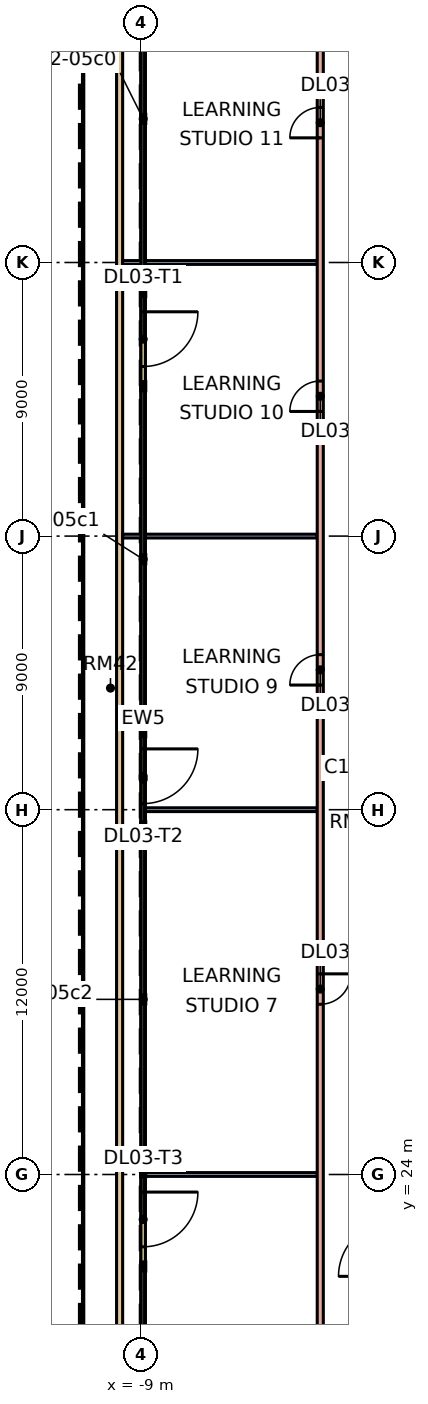
"""IFC4 building model, lengths in metres.
Left out: names, types, materials, properties, quantities, classifications, styles, units other than length and angle.
Written with IfcOpenShell. Run it as: python <this file> out.ifc"""

import sys

from ifc_helpers import new_model, si_unit, direction, frame, frame_2d, origin, place, context, subcontext, project, spatial, rectangle, extrude, element, fill, save


model = new_model("IFC4")
c1 = context("Model", 3, precision=1e-05, world=origin(), true_north=direction((0.0, 1.0)))
c2 = subcontext(c1, "Body", "Model", "MODEL_VIEW")
j1 = project(units=[si_unit("LENGTHUNIT", "METRE"), si_unit("PLANEANGLEUNIT", "RADIAN")], contexts=[c1])
p1 = place(None, origin())
s1 = spatial("IfcSite", under=j1, at=p1, CompositionType="ELEMENT")
p2 = place(p1, origin())
s2 = spatial("IfcBuilding", under=s1, at=p2, CompositionType="ELEMENT")
p3 = place(p2, frame((0.0, 0.0, 16.8)))
s3 = spatial("IfcBuildingStorey", under=s2, at=p3, CompositionType="ELEMENT", Elevation=16.8)
p4 = place(p3, frame((-8.925, 52.978, 0.0), z_axis=(0.0, 0.0, 1.0), x_axis=(0.0, -1.0, 0.0)))
e1 = element("IfcWall", 1, at=p4, inside=s3, PredefinedType="SOLIDWALL", context=c2, shape_type="SweptSolid", body=[
    extrude(rectangle(XDim=3.0, YDim=0.15, at=frame_2d((1.5, 0.0))), origin(), (0.0, 0.0, 1.0), 4.4),
])
p5 = place(p4, frame((0.6, 0.0, 0.0)))
e2 = element("IfcOpeningElement", 2, at=p5, cuts=e1, PredefinedType="OPENING", context=c2, shape_type="SweptSolid", body=[
    extrude(rectangle(XDim=1.8, YDim=2.4, at=frame_2d((0.9, 1.2))), frame((0.0, 0.085, 0.0), z_axis=(0.0, -1.0, 0.0), x_axis=(1.0, 0.0, 0.0)), (0.0, 0.0, 1.0), 0.17),
])
p6 = place(p3, frame((-8.925, 38.5, 0.0), z_axis=(0.0, 0.0, 1.0), x_axis=(0.0, -1.0, 0.0)))
e3 = element("IfcWall", 3, at=p6, inside=s3, PredefinedType="SOLIDWALL", context=c2, shape_type="SweptSolid", body=[
    extrude(rectangle(XDim=3.0, YDim=0.15, at=frame_2d((1.5, 0.0))), origin(), (0.0, 0.0, 1.0), 4.4),
])
p7 = place(p6, frame((0.5, 0.0, 0.0)))
e4 = element("IfcOpeningElement", 4, at=p7, cuts=e3, PredefinedType="OPENING", context=c2, shape_type="SweptSolid", body=[
    extrude(rectangle(XDim=1.8, YDim=2.4, at=frame_2d((0.9, 1.2))), frame((0.0, 0.085, 0.0), z_axis=(0.0, -1.0, 0.0), x_axis=(1.0, 0.0, 0.0)), (0.0, 0.0, 1.0), 0.17),
])
p8 = place(p3, frame((-8.925, 24.022, 0.0), z_axis=(0.0, 0.0, 1.0), x_axis=(0.0, -1.0, 0.0)))
e5 = element("IfcWall", 5, at=p8, inside=s3, PredefinedType="SOLIDWALL", context=c2, shape_type="SweptSolid", body=[
    extrude(rectangle(XDim=3.0, YDim=0.15, at=frame_2d((1.5, 0.0))), origin(), (0.0, 0.0, 1.0), 4.4),
])
p9 = place(p8, frame((0.6, 0.0, 0.0)))
e6 = element("IfcOpeningElement", 6, at=p9, cuts=e5, PredefinedType="OPENING", context=c2, shape_type="SweptSolid", body=[
    extrude(rectangle(XDim=1.8, YDim=2.4, at=frame_2d((0.9, 1.2))), frame((0.0, 0.085, 0.0), z_axis=(0.0, -1.0, 0.0), x_axis=(1.0, 0.0, 0.0)), (0.0, 0.0, 1.0), 0.17),
])
p10 = place(p3, frame((-9.7, 9.104, 0.0), z_axis=(0.0, 0.0, 1.0), x_axis=(0.0, 1.0, 0.0)))
e7 = element("IfcWall", 7, at=p10, inside=s3, PredefinedType="PARAPET", context=c2, shape_type="SweptSolid", body=[
    extrude(rectangle(XDim=55.793, YDim=0.2, at=frame_2d((27.896, 0.0))), origin(), (0.0, 0.0, 1.0), 0.5),
])
for number, where, z_axis, x_axis in (
    (8, (-9.6, 45.0, 0.0), (0.0, 0.0, 1.0), (1.0, 0.0, 0.0)),
    (9, (-9.6, 54.0, 0.0), (0.0, 0.0, 1.0), (1.0, 0.0, 0.0)),
):
    element("IfcWall", number, at=place(p3, frame(where, z_axis=z_axis, x_axis=x_axis)), inside=s3, PredefinedType="PARTITIONING", context=c2, shape_type="SweptSolid", body=[
        extrude(rectangle(XDim=6.4, YDim=0.125, at=frame_2d((3.2, 0.0))), origin(), (0.0, 0.0, 1.0), 4.4),
    ])
for number, where, z_axis, x_axis in (
    (10, (-8.851, 24.0, 0.0), (0.0, 0.0, 1.0), (1.0, 0.0, 0.0)),
    (11, (-8.851, 36.0, 0.0), (0.0, 0.0, 1.0), (1.0, 0.0, 0.0)),
):
    element("IfcWall", number, at=place(p3, frame(where, z_axis=z_axis, x_axis=x_axis)), inside=s3, PredefinedType="PARTITIONING", context=c2, shape_type="SweptSolid", body=[
        extrude(rectangle(XDim=5.651, YDim=0.125, at=frame_2d((2.826, 0.0))), origin(), (0.0, 0.0, 1.0), 4.4),
    ])
p11 = place(p3, frame((-3.1, 2.645, 0.0), z_axis=(0.0, 0.0, 1.0), x_axis=(0.0, 1.0, 0.0)))
e12 = element("IfcWall", 12, at=p11, inside=s3, PredefinedType="PARTITIONING", context=c2, shape_type="SweptSolid", body=[
    extrude(rectangle(XDim=63.455, YDim=0.2, at=frame_2d((31.728, 0.0))), origin(), (0.0, 0.0, 1.0), 4.4),
])
p12 = place(p11, frame((4.705, 0.0, 0.0)))
e13 = element("IfcOpeningElement", 13, at=p12, cuts=e12, PredefinedType="OPENING", context=c2, shape_type="SweptSolid", body=[
    extrude(rectangle(XDim=1.0, YDim=2.1, at=frame_2d((0.5, 1.05))), frame((0.0, 0.11, 0.0), z_axis=(0.0, -1.0, 0.0), x_axis=(1.0, 0.0, 0.0)), (0.0, 0.0, 1.0), 0.22),
])
p13 = place(p11, frame((14.955, 0.0, 0.0)))
e14 = element("IfcOpeningElement", 14, at=p13, cuts=e12, PredefinedType="OPENING", context=c2, shape_type="SweptSolid", body=[
    extrude(rectangle(XDim=1.0, YDim=2.1, at=frame_2d((0.5, 1.05))), frame((0.0, 0.11, 0.0), z_axis=(0.0, -1.0, 0.0), x_axis=(1.0, 0.0, 0.0)), (0.0, 0.0, 1.0), 0.22),
])
p14 = place(p11, frame((26.955, 0.0, 0.0)))
e15 = element("IfcOpeningElement", 15, at=p14, cuts=e12, PredefinedType="OPENING", context=c2, shape_type="SweptSolid", body=[
    extrude(rectangle(XDim=1.0, YDim=2.1, at=frame_2d((0.5, 1.05))), frame((0.0, 0.11, 0.0), z_axis=(0.0, -1.0, 0.0), x_axis=(1.0, 0.0, 0.0)), (0.0, 0.0, 1.0), 0.22),
])
p15 = place(p11, frame((37.455, 0.0, 0.0)))
e16 = element("IfcOpeningElement", 16, at=p15, cuts=e12, PredefinedType="OPENING", context=c2, shape_type="SweptSolid", body=[
    extrude(rectangle(XDim=1.0, YDim=2.1, at=frame_2d((0.5, 1.05))), frame((0.0, 0.11, 0.0), z_axis=(0.0, -1.0, 0.0), x_axis=(1.0, 0.0, 0.0)), (0.0, 0.0, 1.0), 0.22),
])
p16 = place(p11, frame((46.455, 0.0, 0.0)))
e17 = element("IfcOpeningElement", 17, at=p16, cuts=e12, PredefinedType="OPENING", context=c2, shape_type="SweptSolid", body=[
    extrude(rectangle(XDim=1.0, YDim=2.1, at=frame_2d((0.5, 1.05))), frame((0.0, 0.11, 0.0), z_axis=(0.0, -1.0, 0.0), x_axis=(1.0, 0.0, 0.0)), (0.0, 0.0, 1.0), 0.22),
])
p17 = place(p11, frame((55.455, 0.0, 0.0)))
e18 = element("IfcOpeningElement", 18, at=p17, cuts=e12, PredefinedType="OPENING", context=c2, shape_type="SweptSolid", body=[
    extrude(rectangle(XDim=1.0, YDim=2.1, at=frame_2d((0.5, 1.05))), frame((0.0, 0.11, 0.0), z_axis=(0.0, -1.0, 0.0), x_axis=(1.0, 0.0, 0.0)), (0.0, 0.0, 1.0), 0.22),
])
p18 = place(p11, frame((61.305, 0.0, 0.0)))
e19 = element("IfcOpeningElement", 19, at=p18, cuts=e12, PredefinedType="OPENING", context=c2, shape_type="SweptSolid", body=[
    extrude(rectangle(XDim=1.0, YDim=2.1, at=frame_2d((0.5, 1.05))), frame((0.0, 0.11, 0.0), z_axis=(0.0, -1.0, 0.0), x_axis=(1.0, 0.0, 0.0)), (0.0, 0.0, 1.0), 0.22),
])
p19 = place(p5, origin())
e20 = element("IfcDoor", 20, at=p19, inside=s3, OperationType="DOUBLE_DOOR_SINGLE_SWING", PredefinedType="DOOR", context=c2, shape_type="SweptSolid", body=[
    extrude(rectangle(XDim=1.8, YDim=2.4, at=frame_2d((0.9, 1.2))), frame((0.0, 0.025, 0.0), z_axis=(0.0, -1.0, 0.0), x_axis=(1.0, 0.0, 0.0)), (0.0, 0.0, 1.0), 0.05),
])
fill(e2, e20)
p20 = place(p7, origin())
e21 = element("IfcDoor", 21, at=p20, inside=s3, OperationType="DOUBLE_DOOR_SINGLE_SWING", PredefinedType="DOOR", context=c2, shape_type="SweptSolid", body=[
    extrude(rectangle(XDim=1.8, YDim=2.4, at=frame_2d((0.9, 1.2))), frame((0.0, 0.025, 0.0), z_axis=(0.0, -1.0, 0.0), x_axis=(1.0, 0.0, 0.0)), (0.0, 0.0, 1.0), 0.05),
])
fill(e4, e21)
p21 = place(p9, origin())
e22 = element("IfcDoor", 22, at=p21, inside=s3, OperationType="DOUBLE_DOOR_SINGLE_SWING", PredefinedType="DOOR", context=c2, shape_type="SweptSolid", body=[
    extrude(rectangle(XDim=1.8, YDim=2.4, at=frame_2d((0.9, 1.2))), frame((0.0, 0.025, 0.0), z_axis=(0.0, -1.0, 0.0), x_axis=(1.0, 0.0, 0.0)), (0.0, 0.0, 1.0), 0.05),
])
fill(e6, e22)
p22 = place(p14, origin())
e23 = element("IfcDoor", 23, at=p22, inside=s3, OperationType="SINGLE_SWING_RIGHT", PredefinedType="DOOR", context=c2, shape_type="SweptSolid", body=[
    extrude(rectangle(XDim=1.0, YDim=2.1, at=frame_2d((0.5, 1.05))), frame((0.0, 0.025, 0.0), z_axis=(0.0, -1.0, 0.0), x_axis=(1.0, 0.0, 0.0)), (0.0, 0.0, 1.0), 0.05),
])
fill(e15, e23)
p23 = place(p15, origin())
e24 = element("IfcDoor", 24, at=p23, inside=s3, OperationType="SINGLE_SWING_LEFT", PredefinedType="DOOR", context=c2, shape_type="SweptSolid", body=[
    extrude(rectangle(XDim=1.0, YDim=2.1, at=frame_2d((0.5, 1.05))), frame((0.0, 0.025, 0.0), z_axis=(0.0, -1.0, 0.0), x_axis=(1.0, 0.0, 0.0)), (0.0, 0.0, 1.0), 0.05),
])
fill(e16, e24)
p24 = place(p16, origin())
e25 = element("IfcDoor", 25, at=p24, inside=s3, OperationType="SINGLE_SWING_LEFT", PredefinedType="DOOR", context=c2, shape_type="SweptSolid", body=[
    extrude(rectangle(XDim=1.0, YDim=2.1, at=frame_2d((0.5, 1.05))), frame((0.0, 0.025, 0.0), z_axis=(0.0, -1.0, 0.0), x_axis=(1.0, 0.0, 0.0)), (0.0, 0.0, 1.0), 0.05),
])
fill(e17, e25)
p25 = place(p17, origin())
e26 = element("IfcDoor", 26, at=p25, inside=s3, OperationType="SINGLE_SWING_LEFT", PredefinedType="DOOR", context=c2, shape_type="SweptSolid", body=[
    extrude(rectangle(XDim=1.0, YDim=2.1, at=frame_2d((0.5, 1.05))), frame((0.0, 0.025, 0.0), z_axis=(0.0, -1.0, 0.0), x_axis=(1.0, 0.0, 0.0)), (0.0, 0.0, 1.0), 0.05),
])
fill(e18, e26)
save(model, sys.argv[1])
